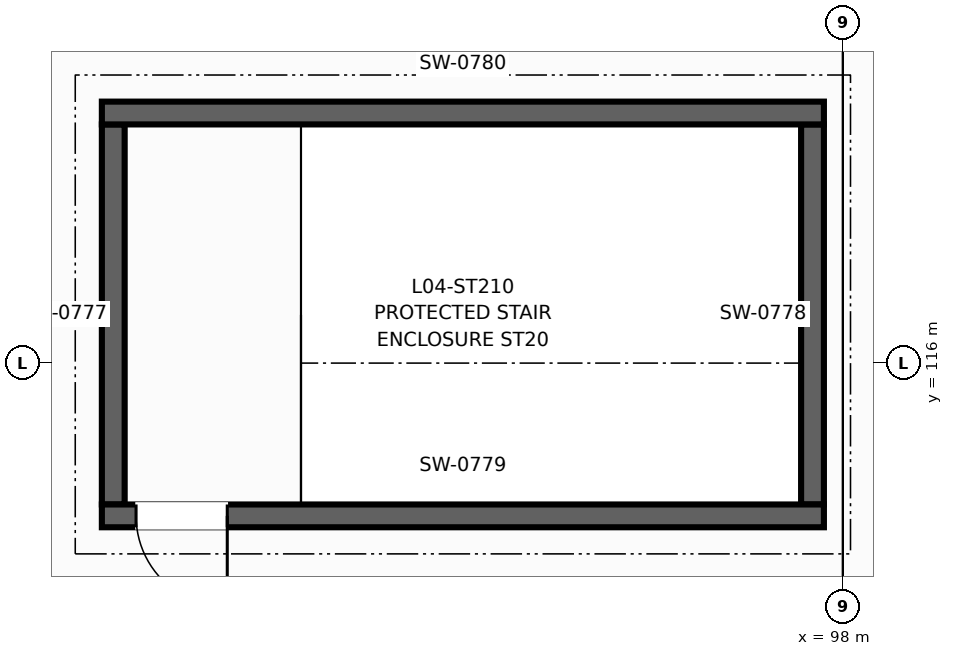
"""IFC4 building model, lengths in metres.
Left out: names, types, materials, properties, quantities, classifications, styles, units other than length and angle.
Written with IfcOpenShell. Run it as: python <this file> out.ifc"""

import sys

from ifc_helpers import new_model, si_unit, direction, frame, frame_2d, origin, place, context, subcontext, project, spatial, rectangle, extrude, element, fill, save


model = new_model("IFC4")
c1 = context("Model", 3, precision=1e-05, world=origin(), true_north=direction((0.0, 1.0)))
c2 = subcontext(c1, "Body", "Model", "MODEL_VIEW")
j1 = project(units=[si_unit("LENGTHUNIT", "METRE"), si_unit("PLANEANGLEUNIT", "RADIAN")], contexts=[c1])
p1 = place(None, origin())
s1 = spatial("IfcSite", under=j1, at=p1, CompositionType="ELEMENT")
p2 = place(p1, origin())
s2 = spatial("IfcBuilding", under=s1, at=p2, CompositionType="ELEMENT")
p3 = place(p2, frame((0.0, 0.0, 18.0)))
s3 = spatial("IfcBuildingStorey", under=s2, at=p3, CompositionType="ELEMENT", Elevation=18.0)
for number, where, z_axis, x_axis in (
    (1, (88.4, 114.14, 0.0), (0.0, 0.0, 1.0), (0.0, 1.0, 0.0)),
    (2, (97.6, 114.14, 0.0), (0.0, 0.0, 1.0), (0.0, 1.0, 0.0)),
):
    element("IfcWall", number, at=place(p3, frame(where, z_axis=z_axis, x_axis=x_axis)), inside=s3, PredefinedType="SHEAR", context=c2, shape_type="SweptSolid", body=[
        extrude(rectangle(XDim=5.0, YDim=0.3, at=frame_2d((2.5, 0.0))), origin(), (0.0, 0.0, 1.0), 4.25),
    ])
p4 = place(p3, frame((88.25, 113.99, 0.0), z_axis=(0.0, 0.0, 1.0), x_axis=(1.0, 0.0, 0.0)))
e3 = element("IfcWall", 3, at=p4, inside=s3, PredefinedType="SHEAR", context=c2, shape_type="SweptSolid", body=[
    extrude(rectangle(XDim=9.5, YDim=0.3, at=frame_2d((4.75, 0.0))), origin(), (0.0, 0.0, 1.0), 4.25),
])
p5 = place(p4, frame((0.45, 0.0, 0.0)))
e4 = element("IfcOpeningElement", 4, at=p5, cuts=e3, PredefinedType="OPENING", context=c2, shape_type="SweptSolid", body=[
    extrude(rectangle(XDim=1.2, YDim=2.2, at=frame_2d((0.6, 1.1))), frame((0.0, 0.16, 0.0), z_axis=(0.0, -1.0, 0.0), x_axis=(1.0, 0.0, 0.0)), (0.0, 0.0, 1.0), 0.32),
])
p6 = place(p3, frame((88.25, 119.29, 0.0), z_axis=(0.0, 0.0, 1.0), x_axis=(1.0, 0.0, 0.0)))
e5 = element("IfcWall", 5, at=p6, inside=s3, PredefinedType="SHEAR", context=c2, shape_type="SweptSolid", body=[
    extrude(rectangle(XDim=9.5, YDim=0.3, at=frame_2d((4.75, 0.0))), origin(), (0.0, 0.0, 1.0), 4.25),
])
p7 = place(p5, frame((1.2, 0.0, 0.0), z_axis=(0.0, 0.0, 1.0), x_axis=(-1.0, 0.0, 0.0)))
e6 = element("IfcDoor", 6, at=p7, inside=s3, OperationType="SINGLE_SWING_RIGHT", PredefinedType="DOOR", context=c2, shape_type="SweptSolid", body=[
    extrude(rectangle(XDim=1.2, YDim=2.2, at=frame_2d((0.6, 1.1))), frame((0.0, 0.025, 0.0), z_axis=(0.0, -1.0, 0.0), x_axis=(1.0, 0.0, 0.0)), (0.0, 0.0, 1.0), 0.05),
])
fill(e4, e6)
save(model, sys.argv[1])
